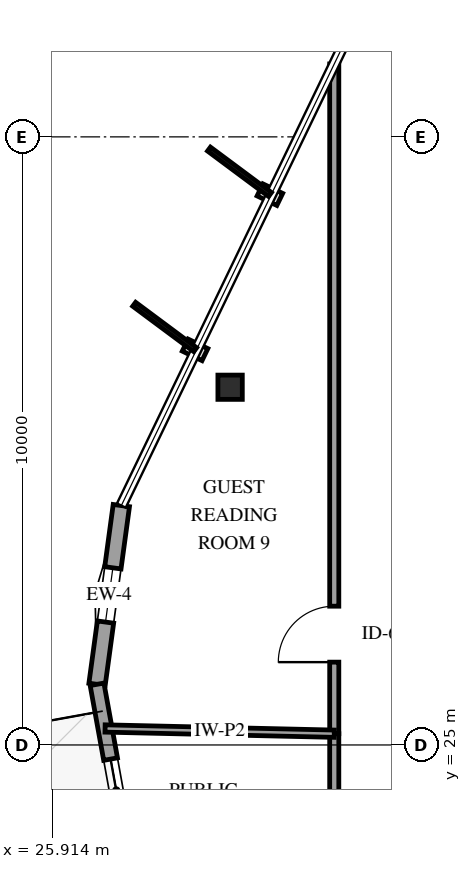
"""IFC4 building model, lengths in metres.
Left out: names, types, materials, properties, quantities, classifications, styles, units other than length and angle.
Written with IfcOpenShell. Run it as: python <this file> out.ifc"""

import sys

from ifc_helpers import new_model, si_unit, direction, frame, frame_2d, origin, origin_2d, place, context, subcontext, project, spatial, rectangle, i_section, extrude, element, fill, save


model = new_model("IFC4")
c1 = context("Model", 3, precision=1e-05, world=origin(), true_north=direction((0.0, 1.0)))
c2 = subcontext(c1, "Body", "Model", "MODEL_VIEW")
j1 = project(units=[si_unit("LENGTHUNIT", "METRE"), si_unit("PLANEANGLEUNIT", "RADIAN")], contexts=[c1])
p1 = place(None, origin())
s1 = spatial("IfcSite", under=j1, at=p1, CompositionType="ELEMENT")
p2 = place(p1, origin())
s2 = spatial("IfcBuilding", under=s1, at=p2, CompositionType="ELEMENT")
p3 = place(p2, frame((0.0, 0.0, 268.75)))
s3 = spatial("IfcBuildingStorey", under=s2, at=p3, CompositionType="ELEMENT", Elevation=268.75)
p4 = place(p3, frame((28.837, 30.883, 0.0), z_axis=(0.0, 0.0, 1.0), x_axis=(1.0, 0.0, 0.0)))
e1 = element("IfcColumn", 1, at=p4, inside=s3, PredefinedType="COLUMN", context=c2, shape_type="SweptSolid", body=[
    extrude(i_section(OverallWidth=0.401, OverallDepth=0.399, WebThickness=0.025, FlangeThickness=0.04, FilletRadius=0.038, at=origin_2d()), origin(), (0.0, 0.0, 1.0), 3.75),
])
p5 = place(p3, frame((27.049, 28.937, 0.0), z_axis=(0.0, 0.0, 1.0), x_axis=(-0.134643093572, -0.99089416052, 0.0)))
e2 = element("IfcWall", 2, at=p5, inside=s3, PredefinedType="SOLIDWALL", context=c2, shape_type="SweptSolid", body=[
    extrude(rectangle(XDim=2.967, YDim=0.27, at=frame_2d((1.483, 0.0))), origin(), (0.0, 0.0, 1.0), 2.829),
])
p6 = place(p5, frame((1.033, 0.0, 0.75)))
e3 = element("IfcOpeningElement", 3, at=p6, cuts=e2, PredefinedType="OPENING", context=c2, shape_type="SweptSolid", body=[
    extrude(rectangle(XDim=0.9, YDim=1.5, at=frame_2d((0.45, 0.75))), frame((0.0, 0.145, 0.0), z_axis=(0.0, -1.0, 0.0), x_axis=(1.0, 0.0, 0.0)), (0.0, 0.0, 1.0), 0.29),
])
p7 = place(p3, frame((26.649, 25.997, 0.0), z_axis=(0.0, 0.0, 1.0), x_axis=(0.178109410328, -0.984010689958, 0.0)))
e4 = element("IfcWall", 4, at=p7, inside=s3, PredefinedType="SOLIDWALL", context=c2, shape_type="SweptSolid", body=[
    extrude(rectangle(XDim=8.5, YDim=0.23, at=frame_2d((4.25, 0.0))), origin(), (0.0, 0.0, 1.0), 2.829),
])
p8 = place(p7, frame((3.75, 0.0, 0.0)))
e5 = element("IfcOpeningElement", 5, at=p8, cuts=e4, PredefinedType="OPENING", context=c2, shape_type="SweptSolid", body=[
    extrude(rectangle(XDim=1.0, YDim=2.15, at=frame_2d((0.5, 1.075))), frame((0.0, 0.125, 0.0), z_axis=(0.0, -1.0, 0.0), x_axis=(1.0, 0.0, 0.0)), (0.0, 0.0, 1.0), 0.25),
])
p9 = place(p7, frame((1.25, 0.0, 0.72)))
e6 = element("IfcOpeningElement", 6, at=p9, cuts=e4, PredefinedType="OPENING", context=c2, shape_type="SweptSolid", body=[
    extrude(rectangle(XDim=1.05, YDim=1.55, at=frame_2d((0.525, 0.775))), frame((0.0, 0.125, 0.0), z_axis=(0.0, -1.0, 0.0), x_axis=(1.0, 0.0, 0.0)), (0.0, 0.0, 1.0), 0.25),
])
p10 = place(p7, frame((6.47, 0.0, 0.72)))
e7 = element("IfcOpeningElement", 7, at=p10, cuts=e4, PredefinedType="OPENING", context=c2, shape_type="SweptSolid", body=[
    extrude(rectangle(XDim=1.05, YDim=1.55, at=frame_2d((0.525, 0.775))), frame((0.0, 0.125, 0.0), z_axis=(0.0, -1.0, 0.0), x_axis=(1.0, 0.0, 0.0)), (0.0, 0.0, 1.0), 0.25),
])
p11 = place(p3, frame((30.55, 25.185, 0.0), z_axis=(0.0, 0.0, 1.0), x_axis=(0.0, 1.0, 0.0)))
e8 = element("IfcWall", 8, at=p11, inside=s3, PredefinedType="PARTITIONING", context=c2, shape_type="SweptSolid", body=[
    extrude(rectangle(XDim=11.014, YDim=0.15, at=frame_2d((5.507, 0.0))), origin(), (0.0, 0.0, 1.0), 3.45),
])
p12 = place(p11, frame((1.177, 0.0, 0.0)))
e9 = element("IfcOpeningElement", 9, at=p12, cuts=e8, PredefinedType="OPENING", context=c2, shape_type="SweptSolid", body=[
    extrude(rectangle(XDim=0.92, YDim=2.12, at=frame_2d((0.46, 1.06))), frame((0.0, 0.085, 0.0), z_axis=(0.0, -1.0, 0.0), x_axis=(1.0, 0.0, 0.0)), (0.0, 0.0, 1.0), 0.17),
])
p13 = place(p3, frame((30.55, 21.234, 0.0), z_axis=(0.0, 0.0, 1.0), x_axis=(0.0, 1.0, 0.0)))
e10 = element("IfcWall", 10, at=p13, inside=s3, PredefinedType="PARTITIONING", context=c2, shape_type="SweptSolid", body=[
    extrude(rectangle(XDim=3.951, YDim=0.15, at=frame_2d((1.976, 0.0))), origin(), (0.0, 0.0, 1.0), 3.45),
])
p14 = place(p13, frame((1.5, 0.0, 0.0)))
e11 = element("IfcOpeningElement", 11, at=p14, cuts=e10, PredefinedType="OPENING", context=c2, shape_type="SweptSolid", body=[
    extrude(rectangle(XDim=0.92, YDim=2.12, at=frame_2d((0.46, 1.06))), frame((0.0, 0.085, 0.0), z_axis=(0.0, -1.0, 0.0), x_axis=(1.0, 0.0, 0.0)), (0.0, 0.0, 1.0), 0.17),
])
p15 = place(p3, frame((30.55, 25.185, 0.0), z_axis=(0.0, 0.0, 1.0), x_axis=(-0.999740161223, 0.02279495639, 0.0)))
e12 = element("IfcWall", 12, at=p15, inside=s3, PredefinedType="PARTITIONING", context=c2, shape_type="SweptSolid", body=[
    extrude(rectangle(XDim=3.77, YDim=0.12, at=frame_2d((1.885, 0.0))), origin(), (0.0, 0.0, 1.0), 3.45),
])
p16 = place(p6, origin())
e13 = element("IfcWindow", 13, at=p16, inside=s3, PartitioningType="SINGLE_PANEL", PredefinedType="WINDOW", context=c2, shape_type="SweptSolid", body=[
    extrude(rectangle(XDim=0.9, YDim=1.5, at=frame_2d((0.45, 0.75))), frame((0.0, 0.03, 0.0), z_axis=(0.0, -1.0, 0.0), x_axis=(1.0, 0.0, 0.0)), (0.0, 0.0, 1.0), 0.06),
])
fill(e3, e13)
p17 = place(p9, origin())
e14 = element("IfcWindow", 14, at=p17, inside=s3, PartitioningType="SINGLE_PANEL", PredefinedType="WINDOW", context=c2, shape_type="SweptSolid", body=[
    extrude(rectangle(XDim=1.05, YDim=1.55, at=frame_2d((0.525, 0.775))), frame((0.0, 0.03, 0.0), z_axis=(0.0, -1.0, 0.0), x_axis=(1.0, 0.0, 0.0)), (0.0, 0.0, 1.0), 0.06),
])
fill(e6, e14)
p18 = place(p12, origin())
e15 = element("IfcDoor", 15, at=p18, inside=s3, OperationType="SINGLE_SWING_LEFT", PredefinedType="DOOR", context=c2, shape_type="SweptSolid", body=[
    extrude(rectangle(XDim=0.92, YDim=2.12, at=frame_2d((0.46, 1.06))), frame((0.0, 0.025, 0.0), z_axis=(0.0, -1.0, 0.0), x_axis=(1.0, 0.0, 0.0)), (0.0, 0.0, 1.0), 0.05),
])
fill(e9, e15)
save(model, sys.argv[1])
